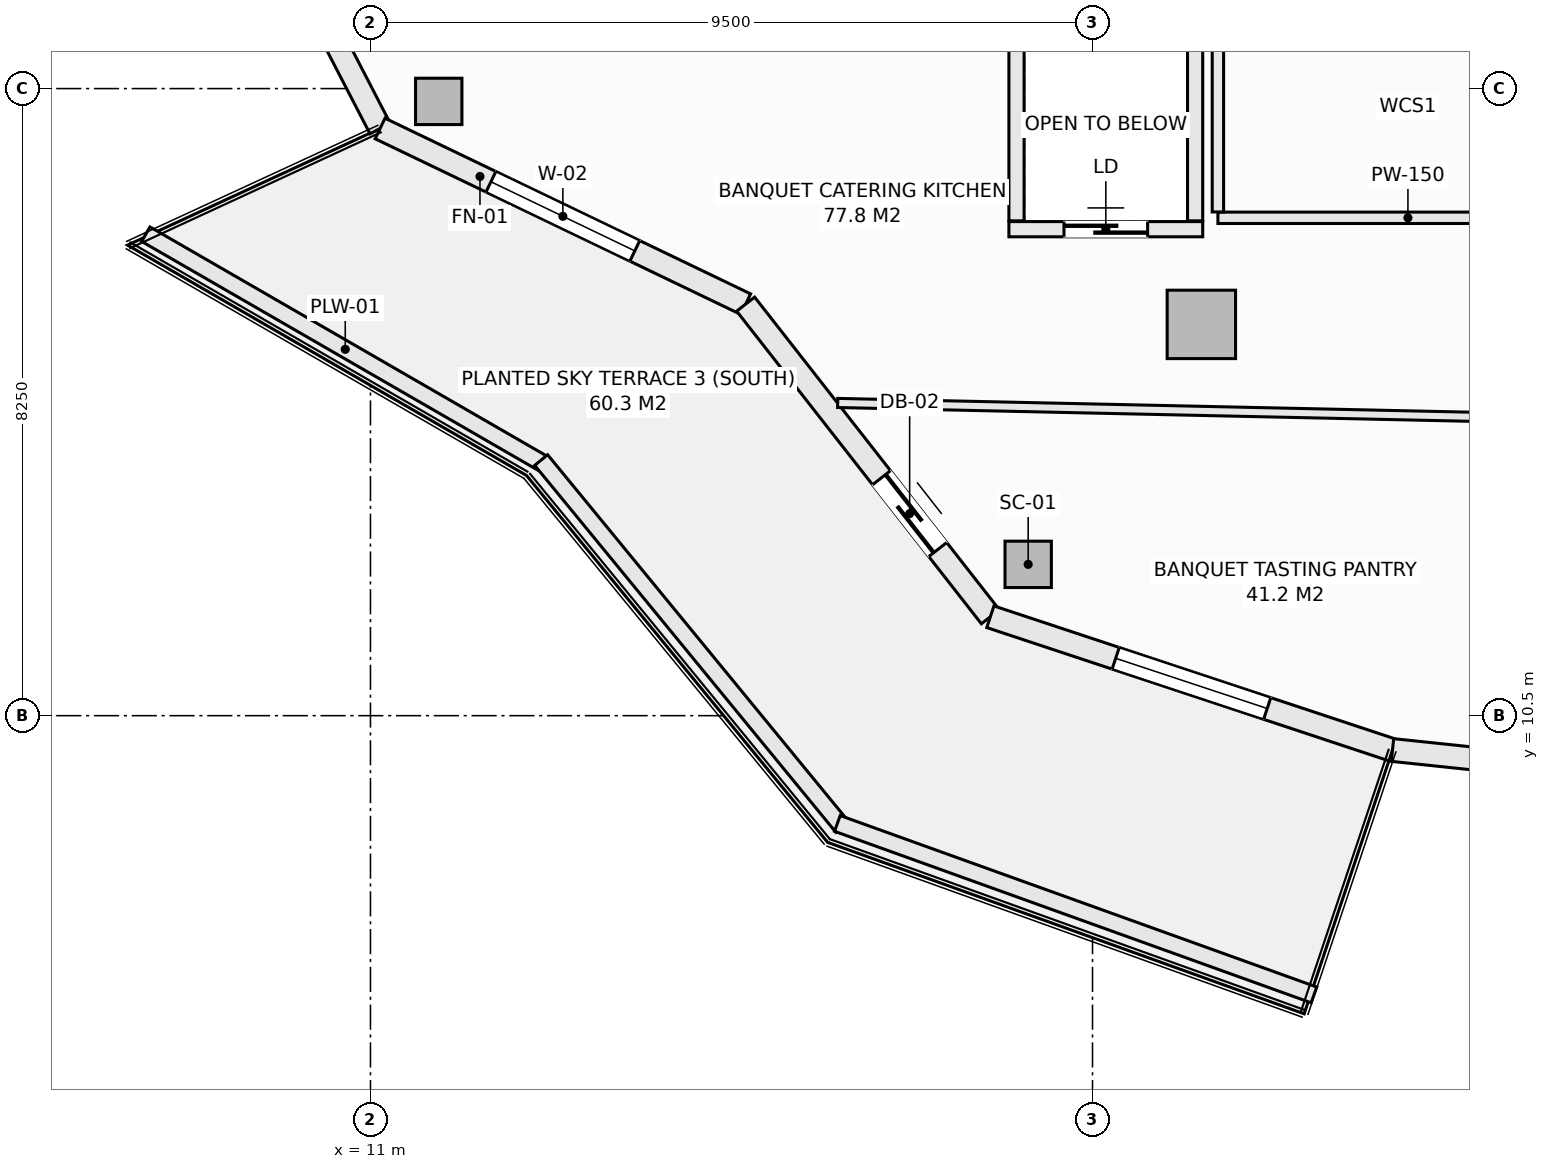
"""IFC4 building model, lengths in metres.
Left out: names, types, materials, properties, quantities, classifications, styles, units other than length and angle.
Written with IfcOpenShell. Run it as: python <this file> out.ifc"""

import sys

from ifc_helpers import new_model, si_unit, direction, frame, frame_2d, origin, origin_2d, place, context, subcontext, project, spatial, rectangle, hollow_rectangle, extrude, element, fill, save


model = new_model("IFC4")
c1 = context("Model", 3, precision=1e-05, world=origin(), true_north=direction((0.0, 1.0)))
c2 = subcontext(c1, "Body", "Model", "MODEL_VIEW")
j1 = project(units=[si_unit("LENGTHUNIT", "METRE"), si_unit("PLANEANGLEUNIT", "RADIAN")], contexts=[c1])
p1 = place(None, origin())
s1 = spatial("IfcSite", under=j1, at=p1, CompositionType="ELEMENT")
p2 = place(p1, origin())
s2 = spatial("IfcBuilding", under=s1, at=p2, CompositionType="ELEMENT")
p3 = place(p2, frame((0.0, 0.0, 146.1)))
s3 = spatial("IfcBuildingStorey", under=s2, at=p3, CompositionType="ELEMENT", Elevation=146.1)
for number, where, z_axis, x_axis in (
    (1, (11.898, 18.581, -0.27), (0.0, 0.0, 1.0), (1.0, 0.0, 0.0)),
    (2, (19.654, 12.49, -0.27), (0.0, 0.0, 1.0), (1.0, 0.0, 0.0)),
):
    element("IfcColumn", number, at=place(p3, frame(where, z_axis=z_axis, x_axis=x_axis)), inside=s3, PredefinedType="COLUMN", context=c2, shape_type="SweptSolid", body=[
        extrude(hollow_rectangle(XDim=0.61, YDim=0.61, WallThickness=0.025, at=origin_2d()), origin(), (0.0, 0.0, 1.0), 3.4),
    ])
p4 = place(p3, frame((21.932, 15.648, -0.27), z_axis=(0.0, 0.0, 1.0), x_axis=(1.0, 0.0, 0.0)))
e3 = element("IfcColumn", 3, at=p4, inside=s3, PredefinedType="COLUMN", context=c2, shape_type="SweptSolid", body=[
    extrude(rectangle(XDim=0.9, YDim=0.9, at=origin_2d()), origin(), (0.0, 0.0, 1.0), 3.4),
])
p5 = place(p3, frame((8.935, 22.458, 0.0), z_axis=(0.0, 0.0, 1.0), x_axis=(0.459810251451, -0.888017191647, 0.0)))
e4 = element("IfcWall", 4, at=p5, inside=s3, PredefinedType="SOLIDWALL", context=c2, shape_type="SweptSolid", body=[
    extrude(rectangle(XDim=4.766, YDim=0.3, at=frame_2d((2.383, 0.0))), origin(), (0.0, 0.0, 1.0), 2.653),
])
p6 = place(p5, frame((1.333, 0.0, 0.74)))
e5 = element("IfcOpeningElement", 5, at=p6, cuts=e4, PredefinedType="OPENING", context=c2, shape_type="SweptSolid", body=[
    extrude(rectangle(XDim=2.1, YDim=1.7, at=frame_2d((1.05, 0.85))), frame((0.0, 0.16, 0.0), z_axis=(0.0, -1.0, 0.0), x_axis=(1.0, 0.0, 0.0)), (0.0, 0.0, 1.0), 0.32),
])
p7 = place(p3, frame((11.127, 18.225, 0.0), z_axis=(0.0, 0.0, 1.0), x_axis=(0.901353070301, -0.433085029363, 0.0)))
e6 = element("IfcWall", 6, at=p7, inside=s3, PredefinedType="SOLIDWALL", context=c2, shape_type="SweptSolid", body=[
    extrude(rectangle(XDim=5.336, YDim=0.3, at=frame_2d((2.668, 0.0))), origin(), (0.0, 0.0, 1.0), 2.653),
])
p8 = place(p7, frame((1.618, 0.0, 0.74)))
e7 = element("IfcOpeningElement", 7, at=p8, cuts=e6, PredefinedType="OPENING", context=c2, shape_type="SweptSolid", body=[
    extrude(rectangle(XDim=2.1, YDim=1.7, at=frame_2d((1.05, 0.85))), frame((0.0, 0.16, 0.0), z_axis=(0.0, -1.0, 0.0), x_axis=(1.0, 0.0, 0.0)), (0.0, 0.0, 1.0), 0.32),
])
p9 = place(p3, frame((15.937, 15.914, 0.0), z_axis=(0.0, 0.0, 1.0), x_axis=(0.616429245738, -0.787410302828, 0.0)))
e8 = element("IfcWall", 8, at=p9, inside=s3, PredefinedType="SOLIDWALL", context=c2, shape_type="SweptSolid", body=[
    extrude(rectangle(XDim=5.223, YDim=0.3, at=frame_2d((2.612, 0.0))), origin(), (0.0, 0.0, 1.0), 2.653),
])
p10 = place(p9, frame((2.9, 0.0, 0.0)))
e9 = element("IfcOpeningElement", 9, at=p10, cuts=e8, PredefinedType="OPENING", context=c2, shape_type="SweptSolid", body=[
    extrude(rectangle(XDim=1.2, YDim=2.2, at=frame_2d((0.6, 1.1))), frame((0.0, 0.16, 0.0), z_axis=(0.0, -1.0, 0.0), x_axis=(1.0, 0.0, 0.0)), (0.0, 0.0, 1.0), 0.32),
])
p11 = place(p3, frame((19.156, 11.801, 0.0), z_axis=(0.0, 0.0, 1.0), x_axis=(0.949246811547, -0.314532177636, 0.0)))
e10 = element("IfcWall", 10, at=p11, inside=s3, PredefinedType="SOLIDWALL", context=c2, shape_type="SweptSolid", body=[
    extrude(rectangle(XDim=5.574, YDim=0.3, at=frame_2d((2.787, 0.0))), origin(), (0.0, 0.0, 1.0), 2.653),
])
p12 = place(p11, frame((1.737, 0.0, 0.74)))
e11 = element("IfcOpeningElement", 11, at=p12, cuts=e10, PredefinedType="OPENING", context=c2, shape_type="SweptSolid", body=[
    extrude(rectangle(XDim=2.1, YDim=1.7, at=frame_2d((1.05, 0.85))), frame((0.0, 0.16, 0.0), z_axis=(0.0, -1.0, 0.0), x_axis=(1.0, 0.0, 0.0)), (0.0, 0.0, 1.0), 0.32),
])
p13 = place(p3, frame((24.447, 10.048, 0.0), z_axis=(0.0, 0.0, 1.0), x_axis=(0.994496545245, -0.104769372887, 0.0)))
e12 = element("IfcWall", 12, at=p13, inside=s3, PredefinedType="SOLIDWALL", context=c2, shape_type="SweptSolid", body=[
    extrude(rectangle(XDim=5.709, YDim=0.3, at=frame_2d((2.854, 0.0))), origin(), (0.0, 0.0, 1.0), 2.653),
])
p14 = place(p13, frame((1.805, 0.0, 0.74)))
e13 = element("IfcOpeningElement", 13, at=p14, cuts=e12, PredefinedType="OPENING", context=c2, shape_type="SweptSolid", body=[
    extrude(rectangle(XDim=2.1, YDim=1.7, at=frame_2d((1.05, 0.85))), frame((0.0, 0.16, 0.0), z_axis=(0.0, -1.0, 0.0), x_axis=(1.0, 0.0, 0.0)), (0.0, 0.0, 1.0), 0.32),
])
p15 = place(p3, frame((8.044, 16.834, 0.0), z_axis=(0.0, 0.0, 1.0), x_axis=(0.866058128659, -0.499943314571, 0.0)))
e14 = element("IfcWall", 14, at=p15, inside=s3, PredefinedType="PARAPET", context=c2, shape_type="SweptSolid", body=[
    extrude(rectangle(XDim=6.06, YDim=0.22, at=frame_2d((3.03, 0.0))), origin(), (0.0, 0.0, 1.0), 0.52),
])
p16 = place(p3, frame((13.246, 13.863, 0.0), z_axis=(0.0, 0.0, 1.0), x_axis=(0.634429234628, -0.77298094818, 0.0)))
e15 = element("IfcWall", 15, at=p16, inside=s3, PredefinedType="PARAPET", context=c2, shape_type="SweptSolid", body=[
    extrude(rectangle(XDim=6.245, YDim=0.22, at=frame_2d((3.123, 0.0))), origin(), (0.0, 0.0, 1.0), 0.52),
])
p17 = place(p3, frame((17.143, 9.082, 0.0), z_axis=(0.0, 0.0, 1.0), x_axis=(0.940948576924, -0.338549517184, 0.0)))
e16 = element("IfcWall", 16, at=p17, inside=s3, PredefinedType="PARAPET", context=c2, shape_type="SweptSolid", body=[
    extrude(rectangle(XDim=6.664, YDim=0.22, at=frame_2d((3.332, 0.0))), origin(), (0.0, 0.0, 1.0), 0.52),
])
p18 = place(p3, frame((19.4, 16.9, 0.0), z_axis=(0.0, 0.0, 1.0), x_axis=(1.0, 0.0, 0.0)))
e17 = element("IfcWall", 17, at=p18, inside=s3, PredefinedType="SOLIDWALL", context=c2, shape_type="SweptSolid", body=[
    extrude(rectangle(XDim=2.55, YDim=0.2, at=frame_2d((1.275, 0.0))), origin(), (0.0, 0.0, 1.0), 3.13),
])
p19 = place(p18, frame((0.725, 0.0, 0.0)))
e18 = element("IfcOpeningElement", 18, at=p19, cuts=e17, PredefinedType="OPENING", context=c2, shape_type="SweptSolid", body=[
    extrude(rectangle(XDim=1.1, YDim=2.2, at=frame_2d((0.55, 1.1))), frame((0.0, 0.11, 0.0), z_axis=(0.0, -1.0, 0.0), x_axis=(1.0, 0.0, 0.0)), (0.0, 0.0, 1.0), 0.22),
])
for number, where, z_axis, x_axis in (
    (19, (19.5, 17.01, 0.0), (0.0, 0.0, 1.0), (0.0, 1.0, 0.0)),
    (20, (21.85, 17.01, 0.0), (0.0, 0.0, 1.0), (0.0, 1.0, 0.0)),
):
    element("IfcWall", number, at=place(p3, frame(where, z_axis=z_axis, x_axis=x_axis)), inside=s3, PredefinedType="SOLIDWALL", context=c2, shape_type="SweptSolid", body=[
        extrude(rectangle(XDim=2.53, YDim=0.2, at=frame_2d((1.265, 0.0))), origin(), (0.0, 0.0, 1.0), 3.13),
    ])
p20 = place(p3, frame((22.15, 17.05, 0.0), z_axis=(0.0, 0.0, 1.0), x_axis=(1.0, 0.0, 0.0)))
e21 = element("IfcWall", 21, at=p20, inside=s3, PredefinedType="PARTITIONING", context=c2, shape_type="SweptSolid", body=[
    extrude(rectangle(XDim=5.0, YDim=0.15, at=frame_2d((2.5, 0.0))), origin(), (0.0, 0.0, 1.0), 3.13),
])
p21 = place(p3, frame((22.15, 17.127, 0.0), z_axis=(0.0, 0.0, 1.0), x_axis=(0.0, 1.0, 0.0)))
e22 = element("IfcWall", 22, at=p21, inside=s3, PredefinedType="PARTITIONING", context=c2, shape_type="SweptSolid", body=[
    extrude(rectangle(XDim=2.721, YDim=0.15, at=frame_2d((1.36, 0.0))), origin(), (0.0, 0.0, 1.0), 3.13),
])
p22 = place(p3, frame((17.147, 14.614, 0.0), z_axis=(0.0, 0.0, 1.0), x_axis=(0.99976262581, -0.021787428337, 0.0)))
e23 = element("IfcWall", 23, at=p22, inside=s3, PredefinedType="PARTITIONING", context=c2, shape_type="SweptSolid", body=[
    extrude(rectangle(XDim=9.928, YDim=0.12, at=frame_2d((4.964, 0.0))), origin(), (0.0, 0.0, 1.0), 2.653),
])
p23 = place(p8, origin())
e24 = element("IfcWindow", 24, at=p23, inside=s3, PartitioningType="SINGLE_PANEL", PredefinedType="WINDOW", context=c2, shape_type="SweptSolid", body=[
    extrude(rectangle(XDim=2.1, YDim=1.7, at=frame_2d((1.05, 0.85))), frame((0.0, 0.03, 0.0), z_axis=(0.0, -1.0, 0.0), x_axis=(1.0, 0.0, 0.0)), (0.0, 0.0, 1.0), 0.06),
])
fill(e7, e24)
p24 = place(p10, frame((1.2, 0.0, 0.0), z_axis=(0.0, 0.0, 1.0), x_axis=(-1.0, 0.0, 0.0)))
e25 = element("IfcDoor", 25, at=p24, inside=s3, OperationType="SLIDING_TO_LEFT", PredefinedType="DOOR", context=c2, shape_type="SweptSolid", body=[
    extrude(rectangle(XDim=1.2, YDim=2.2, at=frame_2d((0.6, 1.1))), frame((0.0, 0.025, 0.0), z_axis=(0.0, -1.0, 0.0), x_axis=(1.0, 0.0, 0.0)), (0.0, 0.0, 1.0), 0.05),
])
fill(e9, e25)
p25 = place(p12, origin())
e26 = element("IfcWindow", 26, at=p25, inside=s3, PartitioningType="SINGLE_PANEL", PredefinedType="WINDOW", context=c2, shape_type="SweptSolid", body=[
    extrude(rectangle(XDim=2.1, YDim=1.7, at=frame_2d((1.05, 0.85))), frame((0.0, 0.03, 0.0), z_axis=(0.0, -1.0, 0.0), x_axis=(1.0, 0.0, 0.0)), (0.0, 0.0, 1.0), 0.06),
])
fill(e11, e26)
p26 = place(p19, origin())
e27 = element("IfcDoor", 27, at=p26, inside=s3, OperationType="SLIDING_TO_LEFT", PredefinedType="DOOR", context=c2, shape_type="SweptSolid", body=[
    extrude(rectangle(XDim=1.1, YDim=2.2, at=frame_2d((0.55, 1.1))), frame((0.0, 0.025, 0.0), z_axis=(0.0, -1.0, 0.0), x_axis=(1.0, 0.0, 0.0)), (0.0, 0.0, 1.0), 0.05),
])
fill(e18, e27)
save(model, sys.argv[1])
